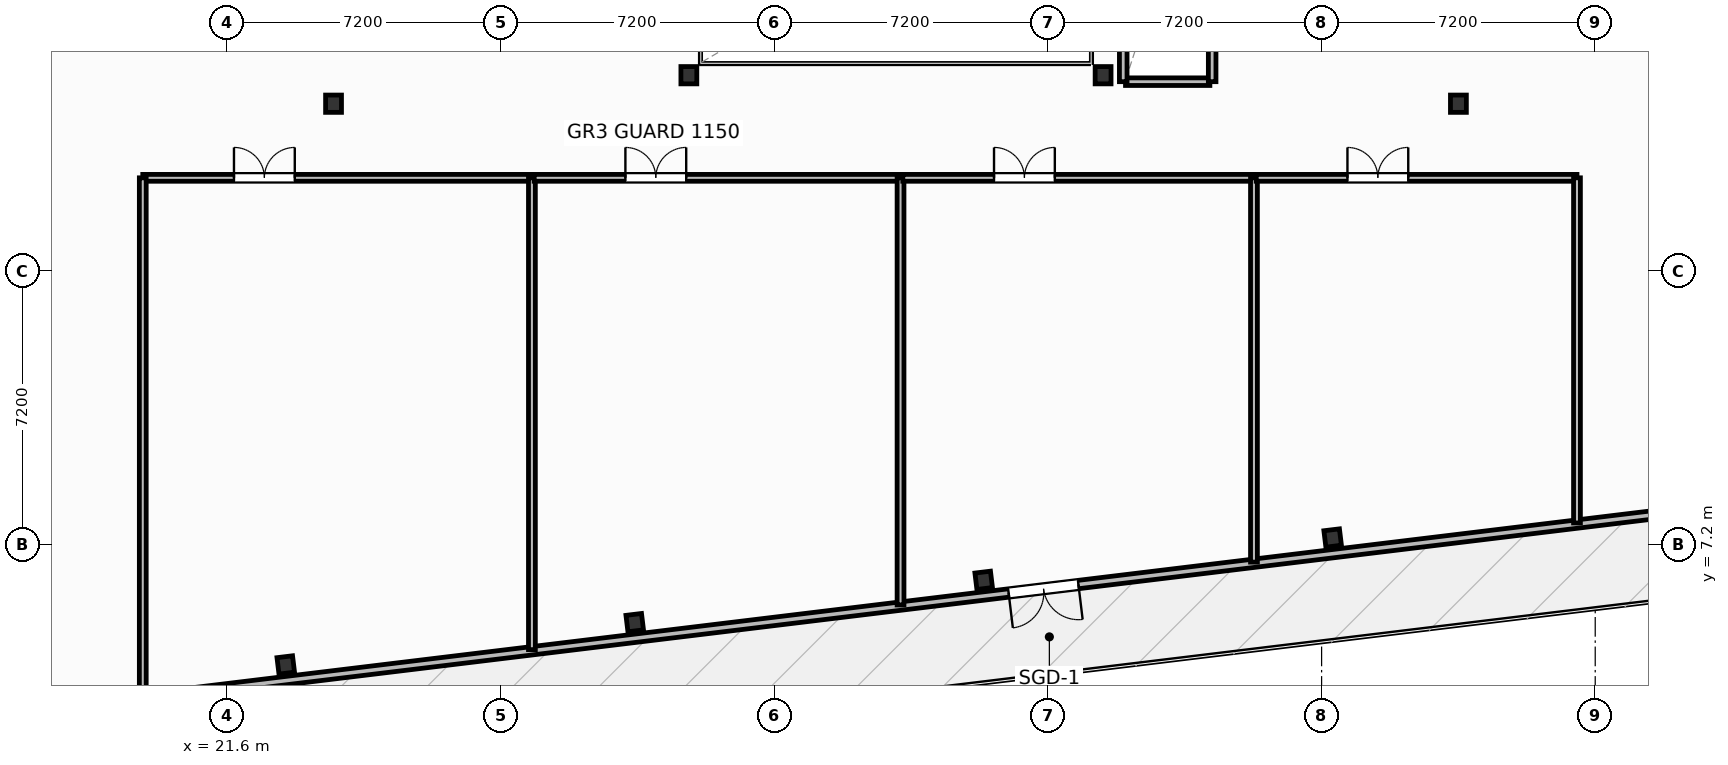
"""IFC4 building model, lengths in metres.
Left out: names, types, materials, properties, quantities, classifications, styles, units other than length and angle.
Written with IfcOpenShell. Run it as: python <this file> out.ifc"""

import sys

from ifc_helpers import new_model, si_unit, direction, frame, frame_2d, origin, origin_2d, place, context, subcontext, project, spatial, rectangle, i_section, extrude, element, fill, save


model = new_model("IFC4")
c1 = context("Model", 3, precision=1e-05, world=origin(), true_north=direction((0.0, 1.0)))
c2 = subcontext(c1, "Body", "Model", "MODEL_VIEW")
j1 = project(units=[si_unit("LENGTHUNIT", "METRE"), si_unit("PLANEANGLEUNIT", "RADIAN")], contexts=[c1])
p1 = place(None, origin())
s1 = spatial("IfcSite", under=j1, at=p1, CompositionType="ELEMENT")
p2 = place(p1, origin())
s2 = spatial("IfcBuilding", under=s1, at=p2, CompositionType="ELEMENT")
p3 = place(p2, frame((0.0, 0.0, 162.4)))
s3 = spatial("IfcBuildingStorey", under=s2, at=p3, CompositionType="ELEMENT", Elevation=162.4)
for number, where, z_axis, x_axis in (
    (1, (33.75, 19.55, 0.0), (0.0, 0.0, 1.0), (1.0, 0.0, 0.0)),
    (2, (44.65, 19.55, 0.0), (0.0, 0.0, 1.0), (1.0, 0.0, 0.0)),
    (3, (24.4, 18.8, 0.0), (0.0, 0.0, 1.0), (1.0, 0.0, 0.0)),
    (4, (54.0, 18.8, 0.0), (0.0, 0.0, 1.0), (1.0, 0.0, 0.0)),
):
    element("IfcColumn", number, at=place(p3, frame(where, z_axis=z_axis, x_axis=x_axis)), inside=s3, PredefinedType="COLUMN", context=c2, shape_type="SweptSolid", body=[
        extrude(i_section(OverallWidth=0.418, OverallDepth=0.455, WebThickness=0.042, FlangeThickness=0.068, FilletRadius=0.025, at=origin_2d()), origin(), (0.0, 0.0, 1.0), 4.8),
    ])
for number, where, z_axis, x_axis in (
    (5, (23.143, 4.033, -0.32), (0.0, 0.0, 1.0), (0.993, 0.12, 0.0)),
    (6, (32.325, 5.146, -0.32), (0.0, 0.0, 1.0), (0.993, 0.12, 0.0)),
    (7, (41.508, 6.26, -0.32), (0.0, 0.0, 1.0), (0.993, 0.12, 0.0)),
    (8, (50.691, 7.373, -0.32), (0.0, 0.0, 1.0), (0.993, 0.12, 0.0)),
):
    element("IfcColumn", number, at=place(p3, frame(where, z_axis=z_axis, x_axis=x_axis)), inside=s3, PredefinedType="COLUMN", context=c2, shape_type="SweptSolid", body=[
        extrude(i_section(OverallWidth=0.412, OverallDepth=0.435, WebThickness=0.036, FlangeThickness=0.057, FilletRadius=0.025, at=origin_2d()), origin(), (0.0, 0.0, 1.0), 5.12),
    ])
p4 = place(p3, frame((69.453, 9.234, 0.0), z_axis=(0.0, 0.0, 1.0), x_axis=(-0.99273203641, -0.120345768043, 0.0)))
e9 = element("IfcWall", 9, at=p4, inside=s3, PredefinedType="SOLIDWALL", context=c2, shape_type="SweptSolid", body=[
    extrude(rectangle(XDim=56.2, YDim=0.22, at=frame_2d((28.1, 0.0))), origin(), (0.0, 0.0, 1.0), 3.83),
])
p5 = place(p4, frame((25.639, 0.0, 0.0)))
e10 = element("IfcOpeningElement", 10, at=p5, cuts=e9, PredefinedType="OPENING", context=c2, shape_type="SweptSolid", body=[
    extrude(rectangle(XDim=1.85, YDim=2.3, at=frame_2d((0.925, 1.15))), frame((0.0, 0.12, 0.0), z_axis=(0.0, -1.0, 0.0), x_axis=(1.0, 0.0, 0.0)), (0.0, 0.0, 1.0), 0.24),
])
p6 = place(p4, frame((0.55, 0.0, 0.75)))
e11 = element("IfcOpeningElement", 11, at=p6, cuts=e9, PredefinedType="OPENING", context=c2, shape_type="SweptSolid", body=[
    extrude(rectangle(XDim=1.65, YDim=1.65, at=frame_2d((0.825, 0.825))), frame((0.0, 0.12, 0.0), z_axis=(0.0, -1.0, 0.0), x_axis=(1.0, 0.0, 0.0)), (0.0, 0.0, 1.0), 0.24),
])
p7 = place(p4, frame((54.0, 0.0, 0.75)))
e12 = element("IfcOpeningElement", 12, at=p7, cuts=e9, PredefinedType="OPENING", context=c2, shape_type="SweptSolid", body=[
    extrude(rectangle(XDim=1.65, YDim=1.65, at=frame_2d((0.825, 0.825))), frame((0.0, 0.12, 0.0), z_axis=(0.0, -1.0, 0.0), x_axis=(1.0, 0.0, 0.0)), (0.0, 0.0, 1.0), 0.24),
])
p8 = place(p3, frame((19.38, 16.85, 0.0), z_axis=(0.0, 0.0, 1.0), x_axis=(1.0, 0.0, 0.0)))
e13 = element("IfcWall", 13, at=p8, inside=s3, PredefinedType="PARTITIONING", context=c2, shape_type="SweptSolid", body=[
    extrude(rectangle(XDim=10.24, YDim=0.18, at=frame_2d((5.12, 0.0))), origin(), (0.0, 0.0, 1.0), 4.55),
])
p9 = place(p8, frame((2.4, 0.0, 0.0)))
e14 = element("IfcOpeningElement", 14, at=p9, cuts=e13, PredefinedType="OPENING", context=c2, shape_type="SweptSolid", body=[
    extrude(rectangle(XDim=1.6, YDim=2.05, at=frame_2d((0.8, 1.025))), frame((0.0, 0.1, 0.0), z_axis=(0.0, -1.0, 0.0), x_axis=(1.0, 0.0, 0.0)), (0.0, 0.0, 1.0), 0.2),
])
p10 = place(p3, frame((29.62, 4.436, 0.0), z_axis=(0.0, 0.0, 1.0), x_axis=(0.0, 1.0, 0.0)))
e15 = element("IfcWall", 15, at=p10, inside=s3, PredefinedType="PARTITIONING", context=c2, shape_type="SweptSolid", body=[
    extrude(rectangle(XDim=12.415, YDim=0.18, at=frame_2d((6.207, 0.0))), origin(), (0.0, 0.0, 1.0), 4.55),
])
p11 = place(p3, frame((19.38, 3.194, 0.0), z_axis=(0.0, 0.0, 1.0), x_axis=(0.0, 1.0, 0.0)))
e16 = element("IfcWall", 16, at=p11, inside=s3, PredefinedType="PARTITIONING", context=c2, shape_type="SweptSolid", body=[
    extrude(rectangle(XDim=13.656, YDim=0.18, at=frame_2d((6.828, 0.0))), origin(), (0.0, 0.0, 1.0), 4.55),
])
p12 = place(p3, frame((29.68, 16.85, 0.0), z_axis=(0.0, 0.0, 1.0), x_axis=(1.0, 0.0, 0.0)))
e17 = element("IfcWall", 17, at=p12, inside=s3, PredefinedType="PARTITIONING", context=c2, shape_type="SweptSolid", body=[
    extrude(rectangle(XDim=9.64, YDim=0.18, at=frame_2d((4.82, 0.0))), origin(), (0.0, 0.0, 1.0), 4.55),
])
p13 = place(p12, frame((2.4, 0.0, 0.0)))
e18 = element("IfcOpeningElement", 18, at=p13, cuts=e17, PredefinedType="OPENING", context=c2, shape_type="SweptSolid", body=[
    extrude(rectangle(XDim=1.6, YDim=2.05, at=frame_2d((0.8, 1.025))), frame((0.0, 0.1, 0.0), z_axis=(0.0, -1.0, 0.0), x_axis=(1.0, 0.0, 0.0)), (0.0, 0.0, 1.0), 0.2),
])
p14 = place(p3, frame((39.32, 5.611, 0.0), z_axis=(0.0, 0.0, 1.0), x_axis=(0.0, 1.0, 0.0)))
e19 = element("IfcWall", 19, at=p14, inside=s3, PredefinedType="PARTITIONING", context=c2, shape_type="SweptSolid", body=[
    extrude(rectangle(XDim=11.239, YDim=0.18, at=frame_2d((5.619, 0.0))), origin(), (0.0, 0.0, 1.0), 4.55),
])
p15 = place(p3, frame((39.38, 16.85, 0.0), z_axis=(0.0, 0.0, 1.0), x_axis=(1.0, 0.0, 0.0)))
e20 = element("IfcWall", 20, at=p15, inside=s3, PredefinedType="PARTITIONING", context=c2, shape_type="SweptSolid", body=[
    extrude(rectangle(XDim=9.24, YDim=0.18, at=frame_2d((4.62, 0.0))), origin(), (0.0, 0.0, 1.0), 4.55),
])
p16 = place(p15, frame((2.4, 0.0, 0.0)))
e21 = element("IfcOpeningElement", 21, at=p16, cuts=e20, PredefinedType="OPENING", context=c2, shape_type="SweptSolid", body=[
    extrude(rectangle(XDim=1.6, YDim=2.05, at=frame_2d((0.8, 1.025))), frame((0.0, 0.1, 0.0), z_axis=(0.0, -1.0, 0.0), x_axis=(1.0, 0.0, 0.0)), (0.0, 0.0, 1.0), 0.2),
])
p17 = place(p3, frame((48.62, 6.739, 0.0), z_axis=(0.0, 0.0, 1.0), x_axis=(0.0, 1.0, 0.0)))
e22 = element("IfcWall", 22, at=p17, inside=s3, PredefinedType="PARTITIONING", context=c2, shape_type="SweptSolid", body=[
    extrude(rectangle(XDim=10.111, YDim=0.18, at=frame_2d((5.056, 0.0))), origin(), (0.0, 0.0, 1.0), 4.55),
])
p18 = place(p3, frame((48.68, 16.85, 0.0), z_axis=(0.0, 0.0, 1.0), x_axis=(1.0, 0.0, 0.0)))
e23 = element("IfcWall", 23, at=p18, inside=s3, PredefinedType="PARTITIONING", context=c2, shape_type="SweptSolid", body=[
    extrude(rectangle(XDim=8.44, YDim=0.18, at=frame_2d((4.22, 0.0))), origin(), (0.0, 0.0, 1.0), 4.55),
])
p19 = place(p18, frame((2.4, 0.0, 0.0)))
e24 = element("IfcOpeningElement", 24, at=p19, cuts=e23, PredefinedType="OPENING", context=c2, shape_type="SweptSolid", body=[
    extrude(rectangle(XDim=1.6, YDim=2.05, at=frame_2d((0.8, 1.025))), frame((0.0, 0.1, 0.0), z_axis=(0.0, -1.0, 0.0), x_axis=(1.0, 0.0, 0.0)), (0.0, 0.0, 1.0), 0.2),
])
p20 = place(p3, frame((57.12, 7.769, 0.0), z_axis=(0.0, 0.0, 1.0), x_axis=(0.0, 1.0, 0.0)))
e25 = element("IfcWall", 25, at=p20, inside=s3, PredefinedType="PARTITIONING", context=c2, shape_type="SweptSolid", body=[
    extrude(rectangle(XDim=9.081, YDim=0.18, at=frame_2d((4.541, 0.0))), origin(), (0.0, 0.0, 1.0), 4.55),
])
p21 = place(p3, frame((45.24, 19.38, 0.0), z_axis=(0.0, 0.0, 1.0), x_axis=(1.0, 0.0, 0.0)))
e26 = element("IfcWall", 26, at=p21, inside=s3, PredefinedType="PARTITIONING", context=c2, shape_type="SweptSolid", body=[
    extrude(rectangle(XDim=2.22, YDim=0.2, at=frame_2d((1.11, 0.0))), origin(), (0.0, 0.0, 1.0), 3.762),
])
for number, where, z_axis, x_axis in (
    (27, (45.18, 19.38, 0.0), (0.0, 0.0, 1.0), (0.0, 1.0, 0.0)),
    (28, (47.52, 19.38, 0.0), (0.0, 0.0, 1.0), (0.0, 1.0, 0.0)),
):
    element("IfcWall", number, at=place(p3, frame(where, z_axis=z_axis, x_axis=x_axis)), inside=s3, PredefinedType="PARTITIONING", context=c2, shape_type="SweptSolid", body=[
        extrude(rectangle(XDim=6.9, YDim=0.2, at=frame_2d((3.45, 0.0))), origin(), (0.0, 0.0, 1.0), 4.55),
    ])
p22 = place(p5, origin())
e29 = element("IfcDoor", 29, at=p22, inside=s3, OperationType="DOUBLE_DOOR_SINGLE_SWING", PredefinedType="DOOR", context=c2, shape_type="SweptSolid", body=[
    extrude(rectangle(XDim=1.85, YDim=2.3, at=frame_2d((0.925, 1.15))), frame((0.0, 0.025, 0.0), z_axis=(0.0, -1.0, 0.0), x_axis=(1.0, 0.0, 0.0)), (0.0, 0.0, 1.0), 0.05),
])
fill(e10, e29)
p23 = place(p9, origin())
e30 = element("IfcDoor", 30, at=p23, inside=s3, OperationType="DOUBLE_DOOR_SINGLE_SWING", PredefinedType="DOOR", context=c2, shape_type="SweptSolid", body=[
    extrude(rectangle(XDim=1.6, YDim=2.05, at=frame_2d((0.8, 1.025))), frame((0.0, 0.025, 0.0), z_axis=(0.0, -1.0, 0.0), x_axis=(1.0, 0.0, 0.0)), (0.0, 0.0, 1.0), 0.05),
])
fill(e14, e30)
p24 = place(p13, origin())
e31 = element("IfcDoor", 31, at=p24, inside=s3, OperationType="DOUBLE_DOOR_SINGLE_SWING", PredefinedType="DOOR", context=c2, shape_type="SweptSolid", body=[
    extrude(rectangle(XDim=1.6, YDim=2.05, at=frame_2d((0.8, 1.025))), frame((0.0, 0.025, 0.0), z_axis=(0.0, -1.0, 0.0), x_axis=(1.0, 0.0, 0.0)), (0.0, 0.0, 1.0), 0.05),
])
fill(e18, e31)
p25 = place(p16, origin())
e32 = element("IfcDoor", 32, at=p25, inside=s3, OperationType="DOUBLE_DOOR_SINGLE_SWING", PredefinedType="DOOR", context=c2, shape_type="SweptSolid", body=[
    extrude(rectangle(XDim=1.6, YDim=2.05, at=frame_2d((0.8, 1.025))), frame((0.0, 0.025, 0.0), z_axis=(0.0, -1.0, 0.0), x_axis=(1.0, 0.0, 0.0)), (0.0, 0.0, 1.0), 0.05),
])
fill(e21, e32)
p26 = place(p19, origin())
e33 = element("IfcDoor", 33, at=p26, inside=s3, OperationType="DOUBLE_DOOR_SINGLE_SWING", PredefinedType="DOOR", context=c2, shape_type="SweptSolid", body=[
    extrude(rectangle(XDim=1.6, YDim=2.05, at=frame_2d((0.8, 1.025))), frame((0.0, 0.025, 0.0), z_axis=(0.0, -1.0, 0.0), x_axis=(1.0, 0.0, 0.0)), (0.0, 0.0, 1.0), 0.05),
])
fill(e24, e33)
save(model, sys.argv[1])
